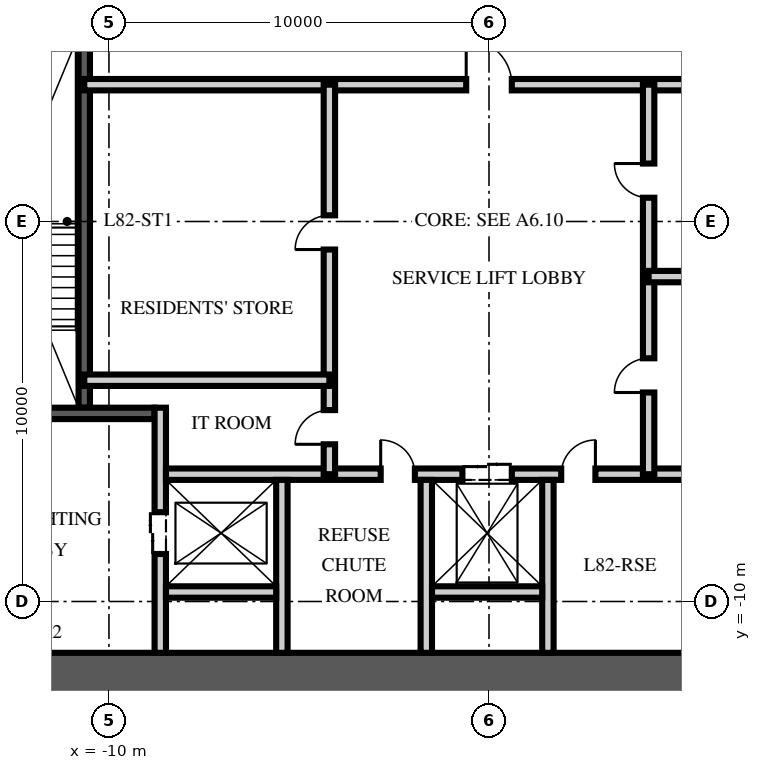
"""IFC4 building model, lengths in metres.
Left out: names, types, materials, properties, quantities, classifications, styles, units other than length and angle.
Written with IfcOpenShell. Run it as: python <this file> out.ifc"""

import sys

from ifc_helpers import new_model, si_unit, direction, frame, frame_2d, origin, place, context, subcontext, project, spatial, rectangle, extrude, element, fill, save


model = new_model("IFC4")
c1 = context("Model", 3, precision=1e-05, world=origin(), true_north=direction((0.0, 1.0)))
c2 = subcontext(c1, "Body", "Model", "MODEL_VIEW")
j1 = project(units=[si_unit("LENGTHUNIT", "METRE"), si_unit("PLANEANGLEUNIT", "RADIAN")], contexts=[c1])
p1 = place(None, origin())
s1 = spatial("IfcSite", under=j1, at=p1, CompositionType="ELEMENT")
p2 = place(p1, origin())
s2 = spatial("IfcBuilding", under=s1, at=p2, CompositionType="ELEMENT")
p3 = place(p2, frame((0.0, 0.0, 327.0)))
s3 = spatial("IfcBuildingStorey", under=s2, at=p3, CompositionType="ELEMENT", Elevation=327.0)
p4 = place(p3, frame((-15.5, -12.0, -0.25), z_axis=(0.0, 0.0, 1.0), x_axis=(1.0, 0.0, 0.0)))
e1 = element("IfcWall", 1, at=p4, inside=s3, PredefinedType="SHEAR", context=c2, shape_type="SweptSolid", body=[
    extrude(rectangle(XDim=31.0, YDim=1.3, at=frame_2d((15.5, 0.0))), origin(), (0.0, 0.0, 1.0), 3.75),
])
p5 = place(p3, frame((-10.65, -4.9, 0.0), z_axis=(0.0, 0.0, 1.0), x_axis=(0.0, 1.0, 0.0)))
e2 = element("IfcWall", 2, at=p5, inside=s3, PredefinedType="SOLIDWALL", context=c2, shape_type="SweptSolid", body=[
    extrude(rectangle(XDim=10.1, YDim=0.3, at=frame_2d((5.05, 0.0))), origin(), (0.0, 0.0, 1.0), 3.5),
])
p6 = place(p3, frame((-14.85, -5.05, 0.0), z_axis=(0.0, 0.0, 1.0), x_axis=(1.0, 0.0, 0.0)))
e3 = element("IfcWall", 3, at=p6, inside=s3, PredefinedType="SOLIDWALL", context=c2, shape_type="SweptSolid", body=[
    extrude(rectangle(XDim=6.05, YDim=0.3, at=frame_2d((3.025, 0.0))), origin(), (0.0, 0.0, 1.0), 3.5),
])
p7 = place(p6, frame((1.425, 0.0, 0.0)))
e4 = element("IfcOpeningElement", 4, at=p7, cuts=e3, PredefinedType="OPENING", context=c2, shape_type="SweptSolid", body=[
    extrude(rectangle(XDim=1.2, YDim=2.1, at=frame_2d((0.6, 1.05))), frame((0.0, 0.16, 0.0), z_axis=(0.0, -1.0, 0.0), x_axis=(1.0, 0.0, 0.0)), (0.0, 0.0, 1.0), 0.32),
])
p8 = place(p3, frame((-8.65, -11.35, 0.0), z_axis=(0.0, 0.0, 1.0), x_axis=(0.0, 1.0, 0.0)))
e5 = element("IfcWall", 5, at=p8, inside=s3, PredefinedType="PARTITIONING", context=c2, shape_type="SweptSolid", body=[
    extrude(rectangle(XDim=6.45, YDim=0.3, at=frame_2d((3.225, 0.0))), origin(), (0.0, 0.0, 1.0), 3.5),
])
p9 = place(p8, frame((2.6, 0.0, 0.0)))
e6 = element("IfcOpeningElement", 6, at=p9, cuts=e5, PredefinedType="OPENING", context=c2, shape_type="SweptSolid", body=[
    extrude(rectangle(XDim=1.1, YDim=2.1, at=frame_2d((0.55, 1.05))), frame((0.0, 0.16, 0.0), z_axis=(0.0, -1.0, 0.0), x_axis=(1.0, 0.0, 0.0)), (0.0, 0.0, 1.0), 0.32),
])
p10 = place(p3, frame((-8.5, -6.65, 0.0), z_axis=(0.0, 0.0, 1.0), x_axis=(1.0, 0.0, 0.0)))
e7 = element("IfcWall", 7, at=p10, inside=s3, PredefinedType="PARTITIONING", context=c2, shape_type="SweptSolid", body=[
    extrude(rectangle(XDim=17.0, YDim=0.3, at=frame_2d((8.5, 0.0))), origin(), (0.0, 0.0, 1.0), 3.5),
])
p11 = place(p10, frame((7.8, 0.0, 0.0)))
e8 = element("IfcOpeningElement", 8, at=p11, cuts=e7, PredefinedType="OPENING", context=c2, shape_type="SweptSolid", body=[
    extrude(rectangle(XDim=1.3, YDim=2.4, at=frame_2d((0.65, 1.2))), frame((0.0, 0.16, 0.0), z_axis=(0.0, -1.0, 0.0), x_axis=(1.0, 0.0, 0.0)), (0.0, 0.0, 1.0), 0.32),
])
p12 = place(p10, frame((5.65, 0.0, 0.0)))
e9 = element("IfcOpeningElement", 9, at=p12, cuts=e7, PredefinedType="OPENING", context=c2, shape_type="SweptSolid", body=[
    extrude(rectangle(XDim=0.9, YDim=2.1, at=frame_2d((0.45, 1.05))), frame((0.0, 0.16, 0.0), z_axis=(0.0, -1.0, 0.0), x_axis=(1.0, 0.0, 0.0)), (0.0, 0.0, 1.0), 0.32),
])
p13 = place(p10, frame((10.4, 0.0, 0.0)))
e10 = element("IfcOpeningElement", 10, at=p13, cuts=e7, PredefinedType="OPENING", context=c2, shape_type="SweptSolid", body=[
    extrude(rectangle(XDim=0.9, YDim=2.1, at=frame_2d((0.45, 1.05))), frame((0.0, 0.16, 0.0), z_axis=(0.0, -1.0, 0.0), x_axis=(1.0, 0.0, 0.0)), (0.0, 0.0, 1.0), 0.32),
])
for number, where, z_axis, x_axis in (
    (11, (-5.45, -11.35, 0.0), (0.0, 0.0, 1.0), (0.0, 1.0, 0.0)),
    (12, (-1.65, -11.35, 0.0), (0.0, 0.0, 1.0), (0.0, 1.0, 0.0)),
    (13, (1.55, -11.35, 0.0), (0.0, 0.0, 1.0), (0.0, 1.0, 0.0)),
):
    element("IfcWall", number, at=place(p3, frame(where, z_axis=z_axis, x_axis=x_axis)), inside=s3, PredefinedType="PARTITIONING", context=c2, shape_type="SweptSolid", body=[
        extrude(rectangle(XDim=4.55, YDim=0.3, at=frame_2d((2.275, 0.0))), origin(), (0.0, 0.0, 1.0), 3.5),
    ])
for number, where, z_axis, x_axis in (
    (14, (-8.5, -9.75, 0.0), (0.0, 0.0, 1.0), (1.0, 0.0, 0.0)),
    (15, (-1.5, -9.75, 0.0), (0.0, 0.0, 1.0), (1.0, 0.0, 0.0)),
):
    element("IfcWall", number, at=place(p3, frame(where, z_axis=z_axis, x_axis=x_axis)), inside=s3, PredefinedType="PARTITIONING", context=c2, shape_type="SweptSolid", body=[
        extrude(rectangle(XDim=2.9, YDim=0.3, at=frame_2d((1.45, 0.0))), origin(), (0.0, 0.0, 1.0), 3.5),
    ])
p14 = place(p3, frame((-10.65, 3.6, 0.0), z_axis=(0.0, 0.0, 1.0), x_axis=(1.0, 0.0, 0.0)))
e16 = element("IfcWall", 16, at=p14, inside=s3, PredefinedType="PARTITIONING", context=c2, shape_type="SweptSolid", body=[
    extrude(rectangle(XDim=21.3, YDim=0.3, at=frame_2d((10.65, 0.0))), origin(), (0.0, 0.0, 1.0), 3.5),
])
p15 = place(p14, frame((10.05, 0.0, 0.0)))
e17 = element("IfcOpeningElement", 17, at=p15, cuts=e16, PredefinedType="OPENING", context=c2, shape_type="SweptSolid", body=[
    extrude(rectangle(XDim=1.2, YDim=2.1, at=frame_2d((0.6, 1.05))), frame((0.0, 0.16, 0.0), z_axis=(0.0, -1.0, 0.0), x_axis=(1.0, 0.0, 0.0)), (0.0, 0.0, 1.0), 0.32),
])
p16 = place(p14, frame((19.238, 0.0, 0.0)))
e18 = element("IfcOpeningElement", 18, at=p16, cuts=e16, PredefinedType="OPENING", context=c2, shape_type="SweptSolid", body=[
    extrude(rectangle(XDim=0.9, YDim=2.1, at=frame_2d((0.45, 1.05))), frame((0.0, 0.16, 0.0), z_axis=(0.0, -1.0, 0.0), x_axis=(1.0, 0.0, 0.0)), (0.0, 0.0, 1.0), 0.32),
])
p17 = place(p3, frame((-4.2, -6.65, 0.0), z_axis=(0.0, 0.0, 1.0), x_axis=(0.0, 1.0, 0.0)))
e19 = element("IfcWall", 19, at=p17, inside=s3, PredefinedType="PARTITIONING", context=c2, shape_type="SweptSolid", body=[
    extrude(rectangle(XDim=10.25, YDim=0.3, at=frame_2d((5.125, 0.0))), origin(), (0.0, 0.0, 1.0), 3.5),
])
p18 = place(p17, frame((0.787, 0.0, 0.0)))
e20 = element("IfcOpeningElement", 20, at=p18, cuts=e19, PredefinedType="OPENING", context=c2, shape_type="SweptSolid", body=[
    extrude(rectangle(XDim=0.9, YDim=2.1, at=frame_2d((0.45, 1.05))), frame((0.0, 0.16, 0.0), z_axis=(0.0, -1.0, 0.0), x_axis=(1.0, 0.0, 0.0)), (0.0, 0.0, 1.0), 0.32),
])
p19 = place(p17, frame((5.912, 0.0, 0.0)))
e21 = element("IfcOpeningElement", 21, at=p19, cuts=e19, PredefinedType="OPENING", context=c2, shape_type="SweptSolid", body=[
    extrude(rectangle(XDim=0.9, YDim=2.1, at=frame_2d((0.45, 1.05))), frame((0.0, 0.16, 0.0), z_axis=(0.0, -1.0, 0.0), x_axis=(1.0, 0.0, 0.0)), (0.0, 0.0, 1.0), 0.32),
])
p20 = place(p3, frame((4.2, -6.65, 0.0), z_axis=(0.0, 0.0, 1.0), x_axis=(0.0, 1.0, 0.0)))
e22 = element("IfcWall", 22, at=p20, inside=s3, PredefinedType="PARTITIONING", context=c2, shape_type="SweptSolid", body=[
    extrude(rectangle(XDim=10.25, YDim=0.3, at=frame_2d((5.125, 0.0))), origin(), (0.0, 0.0, 1.0), 3.5),
])
p21 = place(p20, frame((2.15, 0.0, 0.0)))
e23 = element("IfcOpeningElement", 23, at=p21, cuts=e22, PredefinedType="OPENING", context=c2, shape_type="SweptSolid", body=[
    extrude(rectangle(XDim=0.9, YDim=2.1, at=frame_2d((0.45, 1.05))), frame((0.0, 0.16, 0.0), z_axis=(0.0, -1.0, 0.0), x_axis=(1.0, 0.0, 0.0)), (0.0, 0.0, 1.0), 0.32),
])
p22 = place(p20, frame((7.275, 0.0, 0.0)))
e24 = element("IfcOpeningElement", 24, at=p22, cuts=e22, PredefinedType="OPENING", context=c2, shape_type="SweptSolid", body=[
    extrude(rectangle(XDim=0.9, YDim=2.1, at=frame_2d((0.45, 1.05))), frame((0.0, 0.16, 0.0), z_axis=(0.0, -1.0, 0.0), x_axis=(1.0, 0.0, 0.0)), (0.0, 0.0, 1.0), 0.32),
])
for number, where, z_axis, x_axis in (
    (25, (-10.65, -4.177, 0.0), (0.0, 0.0, 1.0), (1.0, 0.0, 0.0)),
    (26, (10.65, -1.45, 0.0), (0.0, 0.0, 1.0), (-1.0, 0.0, 0.0)),
):
    element("IfcWall", number, at=place(p3, frame(where, z_axis=z_axis, x_axis=x_axis)), inside=s3, PredefinedType="PARTITIONING", context=c2, shape_type="SweptSolid", body=[
        extrude(rectangle(XDim=6.45, YDim=0.3, at=frame_2d((3.225, 0.0))), origin(), (0.0, 0.0, 1.0), 3.5),
    ])
p23 = place(p9, origin())
e27 = element("IfcDoor", 27, at=p23, inside=s3, OperationType="DOUBLE_DOOR_SLIDING", PredefinedType="DOOR", context=c2, shape_type="SweptSolid", body=[
    extrude(rectangle(XDim=1.1, YDim=2.1, at=frame_2d((0.55, 1.05))), frame((0.0, 0.025, 0.0), z_axis=(0.0, -1.0, 0.0), x_axis=(1.0, 0.0, 0.0)), (0.0, 0.0, 1.0), 0.05),
])
fill(e6, e27)
p24 = place(p11, origin())
e28 = element("IfcDoor", 28, at=p24, inside=s3, OperationType="DOUBLE_DOOR_SLIDING", PredefinedType="DOOR", context=c2, shape_type="SweptSolid", body=[
    extrude(rectangle(XDim=1.3, YDim=2.4, at=frame_2d((0.65, 1.2))), frame((0.0, 0.025, 0.0), z_axis=(0.0, -1.0, 0.0), x_axis=(1.0, 0.0, 0.0)), (0.0, 0.0, 1.0), 0.05),
])
fill(e8, e28)
p25 = place(p15, origin())
e29 = element("IfcDoor", 29, at=p25, inside=s3, OperationType="SINGLE_SWING_LEFT", PredefinedType="DOOR", context=c2, shape_type="SweptSolid", body=[
    extrude(rectangle(XDim=1.2, YDim=2.1, at=frame_2d((0.6, 1.05))), frame((0.0, 0.025, 0.0), z_axis=(0.0, -1.0, 0.0), x_axis=(1.0, 0.0, 0.0)), (0.0, 0.0, 1.0), 0.05),
])
fill(e17, e29)
p26 = place(p12, origin())
e30 = element("IfcDoor", 30, at=p26, inside=s3, OperationType="SINGLE_SWING_LEFT", PredefinedType="DOOR", context=c2, shape_type="SweptSolid", body=[
    extrude(rectangle(XDim=0.9, YDim=2.1, at=frame_2d((0.45, 1.05))), frame((0.0, 0.025, 0.0), z_axis=(0.0, -1.0, 0.0), x_axis=(1.0, 0.0, 0.0)), (0.0, 0.0, 1.0), 0.05),
])
fill(e9, e30)
p27 = place(p13, origin())
e31 = element("IfcDoor", 31, at=p27, inside=s3, OperationType="SINGLE_SWING_RIGHT", PredefinedType="DOOR", context=c2, shape_type="SweptSolid", body=[
    extrude(rectangle(XDim=0.9, YDim=2.1, at=frame_2d((0.45, 1.05))), frame((0.0, 0.025, 0.0), z_axis=(0.0, -1.0, 0.0), x_axis=(1.0, 0.0, 0.0)), (0.0, 0.0, 1.0), 0.05),
])
fill(e10, e31)
p28 = place(p18, origin())
e32 = element("IfcDoor", 32, at=p28, inside=s3, OperationType="SINGLE_SWING_LEFT", PredefinedType="DOOR", context=c2, shape_type="SweptSolid", body=[
    extrude(rectangle(XDim=0.9, YDim=2.1, at=frame_2d((0.45, 1.05))), frame((0.0, 0.025, 0.0), z_axis=(0.0, -1.0, 0.0), x_axis=(1.0, 0.0, 0.0)), (0.0, 0.0, 1.0), 0.05),
])
fill(e20, e32)
p29 = place(p19, origin())
e33 = element("IfcDoor", 33, at=p29, inside=s3, OperationType="SINGLE_SWING_LEFT", PredefinedType="DOOR", context=c2, shape_type="SweptSolid", body=[
    extrude(rectangle(XDim=0.9, YDim=2.1, at=frame_2d((0.45, 1.05))), frame((0.0, 0.025, 0.0), z_axis=(0.0, -1.0, 0.0), x_axis=(1.0, 0.0, 0.0)), (0.0, 0.0, 1.0), 0.05),
])
fill(e21, e33)
p30 = place(p21, origin())
e34 = element("IfcDoor", 34, at=p30, inside=s3, OperationType="SINGLE_SWING_LEFT", PredefinedType="DOOR", context=c2, shape_type="SweptSolid", body=[
    extrude(rectangle(XDim=0.9, YDim=2.1, at=frame_2d((0.45, 1.05))), frame((0.0, 0.025, 0.0), z_axis=(0.0, -1.0, 0.0), x_axis=(1.0, 0.0, 0.0)), (0.0, 0.0, 1.0), 0.05),
])
fill(e23, e34)
p31 = place(p22, origin())
e35 = element("IfcDoor", 35, at=p31, inside=s3, OperationType="SINGLE_SWING_RIGHT", PredefinedType="DOOR", context=c2, shape_type="SweptSolid", body=[
    extrude(rectangle(XDim=0.9, YDim=2.1, at=frame_2d((0.45, 1.05))), frame((0.0, 0.025, 0.0), z_axis=(0.0, -1.0, 0.0), x_axis=(1.0, 0.0, 0.0)), (0.0, 0.0, 1.0), 0.05),
])
fill(e24, e35)
save(model, sys.argv[1])
